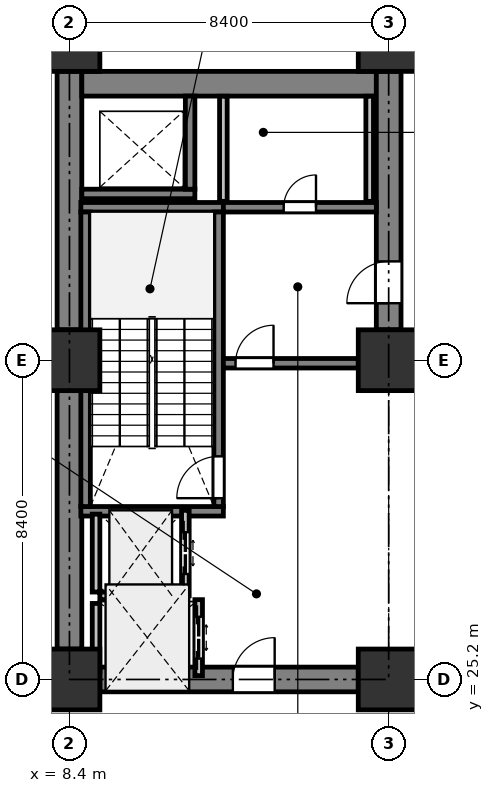
"""IFC4 building model, lengths in metres.
Left out: names, types, materials, properties, quantities, classifications, styles, units other than length and angle.
Written with IfcOpenShell. Run it as: python <this file> out.ifc"""

import sys

from ifc_helpers import new_model, si_unit, direction, frame, frame_2d, origin, origin_2d, place, context, subcontext, project, spatial, rectangle, extrude, element, fill, save


model = new_model("IFC4")
c1 = context("Model", 3, precision=1e-05, world=origin(), true_north=direction((0.0, 1.0)))
c2 = subcontext(c1, "Body", "Model", "MODEL_VIEW")
j1 = project(units=[si_unit("LENGTHUNIT", "METRE"), si_unit("PLANEANGLEUNIT", "RADIAN")], contexts=[c1])
p1 = place(None, origin())
s1 = spatial("IfcSite", under=j1, at=p1, CompositionType="ELEMENT")
p2 = place(p1, origin())
s2 = spatial("IfcBuilding", under=s1, at=p2, CompositionType="ELEMENT")
p3 = place(p2, frame((0.0, 0.0, -4.8)))
s3 = spatial("IfcBuildingStorey", under=s2, at=p3, CompositionType="ELEMENT", Elevation=-4.8)
for number, where, z_axis, x_axis in (
    (1, (8.4, 25.2, 0.0), (0.0, 0.0, 1.0), (1.0, 0.0, 0.0)),
    (2, (8.4, 33.6, 0.0), (0.0, 0.0, 1.0), (1.0, 0.0, 0.0)),
    (3, (8.4, 42.0, 0.0), (0.0, 0.0, 1.0), (1.0, 0.0, 0.0)),
    (4, (16.8, 25.2, 0.0), (0.0, 0.0, 1.0), (1.0, 0.0, 0.0)),
    (5, (16.8, 33.6, 0.0), (0.0, 0.0, 1.0), (1.0, 0.0, 0.0)),
    (6, (16.8, 42.0, 0.0), (0.0, 0.0, 1.0), (1.0, 0.0, 0.0)),
):
    element("IfcColumn", number, at=place(p3, frame(where, z_axis=z_axis, x_axis=x_axis)), inside=s3, PredefinedType="COLUMN", context=c2, shape_type="SweptSolid", body=[
        extrude(rectangle(XDim=1.6, YDim=1.6, at=origin_2d()), origin(), (0.0, 0.0, 1.0), 4.8),
    ])
for number, where, z_axis, x_axis in (
    (7, (8.4, 26.0, 0.0), (0.0, 0.0, 1.0), (0.0, 1.0, 0.0)),
    (8, (8.4, 34.4, 0.0), (0.0, 0.0, 1.0), (0.0, 1.0, 0.0)),
):
    element("IfcWall", number, at=place(p3, frame(where, z_axis=z_axis, x_axis=x_axis)), inside=s3, PredefinedType="SHEAR", context=c2, shape_type="SweptSolid", body=[
        extrude(rectangle(XDim=6.8, YDim=0.65, at=frame_2d((3.4, 0.0))), origin(), (0.0, 0.0, 1.0), 4.48),
    ])
p4 = place(p3, frame((8.725, 40.875, 0.0), z_axis=(0.0, 0.0, 1.0), x_axis=(1.0, 0.0, 0.0)))
e9 = element("IfcWall", 9, at=p4, inside=s3, PredefinedType="SHEAR", context=c2, shape_type="SweptSolid", body=[
    extrude(rectangle(XDim=7.75, YDim=0.65, at=frame_2d((3.875, 0.0))), origin(), (0.0, 0.0, 1.0), 4.48),
])
p5 = place(p3, frame((16.8, 34.4, 0.0), z_axis=(0.0, 0.0, 1.0), x_axis=(0.0, 1.0, 0.0)))
e10 = element("IfcWall", 10, at=p5, inside=s3, PredefinedType="SHEAR", context=c2, shape_type="SweptSolid", body=[
    extrude(rectangle(XDim=6.8, YDim=0.65, at=frame_2d((3.4, 0.0))), origin(), (0.0, 0.0, 1.0), 4.48),
])
p6 = place(p5, frame((0.7, 0.0, 0.0)))
e11 = element("IfcOpeningElement", 11, at=p6, cuts=e10, PredefinedType="OPENING", context=c2, shape_type="SweptSolid", body=[
    extrude(rectangle(XDim=1.1, YDim=2.15, at=frame_2d((0.55, 1.075))), frame((0.0, 0.335, 0.0), z_axis=(0.0, -1.0, 0.0), x_axis=(1.0, 0.0, 0.0)), (0.0, 0.0, 1.0), 0.67),
])
p7 = place(p3, frame((9.2, 25.2, 0.0), z_axis=(0.0, 0.0, 1.0), x_axis=(1.0, 0.0, 0.0)))
e12 = element("IfcWall", 12, at=p7, inside=s3, PredefinedType="SHEAR", context=c2, shape_type="SweptSolid", body=[
    extrude(rectangle(XDim=6.8, YDim=0.65, at=frame_2d((3.4, 0.0))), origin(), (0.0, 0.0, 1.0), 4.48),
])
p8 = place(p7, frame((3.5, 0.0, 0.0)))
e13 = element("IfcOpeningElement", 13, at=p8, cuts=e12, PredefinedType="OPENING", context=c2, shape_type="SweptSolid", body=[
    extrude(rectangle(XDim=1.1, YDim=2.15, at=frame_2d((0.55, 1.075))), frame((0.0, 0.335, 0.0), z_axis=(0.0, -1.0, 0.0), x_axis=(1.0, 0.0, 0.0)), (0.0, 0.0, 1.0), 0.67),
])
for number, where, z_axis, x_axis in (
    (14, (12.45, 29.625, 0.0), (0.0, 0.0, 1.0), (-1.0, 0.0, 0.0)),
    (15, (12.45, 37.625, 0.0), (0.0, 0.0, 1.0), (-1.0, 0.0, 0.0)),
):
    element("IfcWall", number, at=place(p3, frame(where, z_axis=z_axis, x_axis=x_axis)), inside=s3, PredefinedType="SHEAR", context=c2, shape_type="SweptSolid", body=[
        extrude(rectangle(XDim=3.75, YDim=0.25, at=frame_2d((1.875, 0.0))), origin(), (0.0, 0.0, 1.0), 4.48),
    ])
p9 = place(p3, frame((12.325, 29.75, 0.0), z_axis=(0.0, 0.0, 1.0), x_axis=(0.0, 1.0, 0.0)))
e16 = element("IfcWall", 16, at=p9, inside=s3, PredefinedType="SHEAR", context=c2, shape_type="SweptSolid", body=[
    extrude(rectangle(XDim=7.75, YDim=0.25, at=frame_2d((3.875, 0.0))), origin(), (0.0, 0.0, 1.0), 4.48),
])
p10 = place(p9, frame((0.22, 0.0, 0.0)))
e17 = element("IfcOpeningElement", 17, at=p10, cuts=e16, PredefinedType="OPENING", context=c2, shape_type="SweptSolid", body=[
    extrude(rectangle(XDim=1.1, YDim=2.15, at=frame_2d((0.55, 1.075))), frame((0.0, 0.135, 0.0), z_axis=(0.0, -1.0, 0.0), x_axis=(1.0, 0.0, 0.0)), (0.0, 0.0, 1.0), 0.27),
])
p11 = place(p3, frame((8.825, 29.75, 0.0), z_axis=(0.0, 0.0, 1.0), x_axis=(0.0, 1.0, 0.0)))
e18 = element("IfcWall", 18, at=p11, inside=s3, PredefinedType="SHEAR", context=c2, shape_type="SweptSolid", body=[
    extrude(rectangle(XDim=7.75, YDim=0.25, at=frame_2d((3.875, 0.0))), origin(), (0.0, 0.0, 1.0), 4.48),
])
p12 = place(p3, frame((8.725, 37.975, 0.0), z_axis=(0.0, 0.0, 1.0), x_axis=(1.0, 0.0, 0.0)))
e19 = element("IfcWall", 19, at=p12, inside=s3, PredefinedType="SHEAR", context=c2, shape_type="SweptSolid", body=[
    extrude(rectangle(XDim=2.975, YDim=0.25, at=frame_2d((1.487, 0.0))), origin(), (0.0, 0.0, 1.0), 4.48),
])
p13 = place(p3, frame((11.575, 38.1, 0.0), z_axis=(0.0, 0.0, 1.0), x_axis=(0.0, 1.0, 0.0)))
e20 = element("IfcWall", 20, at=p13, inside=s3, PredefinedType="SHEAR", context=c2, shape_type="SweptSolid", body=[
    extrude(rectangle(XDim=2.45, YDim=0.25, at=frame_2d((1.225, 0.0))), origin(), (0.0, 0.0, 1.0), 4.48),
])
p14 = place(p3, frame((12.45, 33.52, 0.0), z_axis=(0.0, 0.0, 1.0), x_axis=(1.0, 0.0, 0.0)))
e21 = element("IfcWall", 21, at=p14, inside=s3, PredefinedType="SHEAR", context=c2, shape_type="SweptSolid", body=[
    extrude(rectangle(XDim=3.55, YDim=0.25, at=frame_2d((1.775, 0.0))), origin(), (0.0, 0.0, 1.0), 4.48),
])
p15 = place(p14, frame((0.32, 0.0, 0.0)))
e22 = element("IfcOpeningElement", 22, at=p15, cuts=e21, PredefinedType="OPENING", context=c2, shape_type="SweptSolid", body=[
    extrude(rectangle(XDim=1.0, YDim=2.15, at=frame_2d((0.5, 1.075))), frame((0.0, 0.135, 0.0), z_axis=(0.0, -1.0, 0.0), x_axis=(1.0, 0.0, 0.0)), (0.0, 0.0, 1.0), 0.27),
])
p16 = place(p3, frame((12.45, 37.625, 0.0), z_axis=(0.0, 0.0, 1.0), x_axis=(1.0, 0.0, 0.0)))
e23 = element("IfcWall", 23, at=p16, inside=s3, PredefinedType="SHEAR", context=c2, shape_type="SweptSolid", body=[
    extrude(rectangle(XDim=4.025, YDim=0.25, at=frame_2d((2.013, 0.0))), origin(), (0.0, 0.0, 1.0), 4.48),
])
p17 = place(p16, frame((1.587, 0.0, 0.0)))
e24 = element("IfcOpeningElement", 24, at=p17, cuts=e23, PredefinedType="OPENING", context=c2, shape_type="SweptSolid", body=[
    extrude(rectangle(XDim=0.85, YDim=2.15, at=frame_2d((0.425, 1.075))), frame((0.0, 0.135, 0.0), z_axis=(0.0, -1.0, 0.0), x_axis=(1.0, 0.0, 0.0)), (0.0, 0.0, 1.0), 0.27),
])
p18 = place(p3, frame((11.45, 27.4, 0.0), z_axis=(0.0, 0.0, 1.0), x_axis=(0.0, 1.0, 0.0)))
e25 = element("IfcWall", 25, at=p18, inside=s3, PredefinedType="PARTITIONING", context=c2, shape_type="SweptSolid", body=[
    extrude(rectangle(XDim=2.25, YDim=0.2, at=frame_2d((1.125, 0.0))), origin(), (0.0, 0.0, 1.0), 4.48),
])
p19 = place(p18, frame((0.575, 0.0, 0.0)))
e26 = element("IfcOpeningElement", 26, at=p19, cuts=e25, PredefinedType="OPENING", context=c2, shape_type="SweptSolid", body=[
    extrude(rectangle(XDim=1.1, YDim=2.2, at=frame_2d((0.55, 1.1))), frame((0.0, 0.11, 0.0), z_axis=(0.0, -1.0, 0.0), x_axis=(1.0, 0.0, 0.0)), (0.0, 0.0, 1.0), 0.22),
])
p20 = place(p3, frame((9.1, 27.5, 0.0), z_axis=(0.0, 0.0, 1.0), x_axis=(0.0, 1.0, 0.0)))
e27 = element("IfcWall", 27, at=p20, inside=s3, PredefinedType="PARTITIONING", context=c2, shape_type="SweptSolid", body=[
    extrude(rectangle(XDim=2.05, YDim=0.2, at=frame_2d((1.025, 0.0))), origin(), (0.0, 0.0, 1.0), 4.48),
])
p21 = place(p3, frame((9.2, 27.4, 0.0), z_axis=(0.0, 0.0, 1.0), x_axis=(1.0, 0.0, 0.0)))
e28 = element("IfcWall", 28, at=p21, inside=s3, PredefinedType="PARTITIONING", context=c2, shape_type="SweptSolid", body=[
    extrude(rectangle(XDim=2.15, YDim=0.2, at=frame_2d((1.075, 0.0))), origin(), (0.0, 0.0, 1.0), 4.48),
])
p22 = place(p3, frame((11.8, 25.3, 0.0), z_axis=(0.0, 0.0, 1.0), x_axis=(0.0, 1.0, 0.0)))
e29 = element("IfcWall", 29, at=p22, inside=s3, PredefinedType="PARTITIONING", context=c2, shape_type="SweptSolid", body=[
    extrude(rectangle(XDim=2.0, YDim=0.2, at=frame_2d((1.0, 0.0))), origin(), (0.0, 0.0, 1.0), 4.48),
])
p23 = place(p22, frame((0.45, 0.0, 0.0)))
e30 = element("IfcOpeningElement", 30, at=p23, cuts=e29, PredefinedType="OPENING", context=c2, shape_type="SweptSolid", body=[
    extrude(rectangle(XDim=1.1, YDim=2.2, at=frame_2d((0.55, 1.1))), frame((0.0, 0.11, 0.0), z_axis=(0.0, -1.0, 0.0), x_axis=(1.0, 0.0, 0.0)), (0.0, 0.0, 1.0), 0.22),
])
p24 = place(p3, frame((9.1, 25.4, 0.0), z_axis=(0.0, 0.0, 1.0), x_axis=(0.0, 1.0, 0.0)))
e31 = element("IfcWall", 31, at=p24, inside=s3, PredefinedType="PARTITIONING", context=c2, shape_type="SweptSolid", body=[
    extrude(rectangle(XDim=1.8, YDim=0.2, at=frame_2d((0.9, 0.0))), origin(), (0.0, 0.0, 1.0), 4.48),
])
for number, where, z_axis, x_axis in (
    (32, (16.3, 37.78, 0.0), (0.0, 0.0, 1.0), (0.0, 1.0, 0.0)),
    (33, (12.45, 40.546, 0.0), (0.0, 0.0, 1.0), (0.0, -1.0, 0.0)),
):
    element("IfcWall", number, at=place(p3, frame(where, z_axis=z_axis, x_axis=x_axis)), inside=s3, PredefinedType="PARTITIONING", context=c2, shape_type="SweptSolid", body=[
        extrude(rectangle(XDim=2.766, YDim=0.2, at=frame_2d((1.383, 0.0))), origin(), (0.0, 0.0, 1.0), 4.48),
    ])
p25 = place(p6, origin())
e34 = element("IfcDoor", 34, at=p25, inside=s3, OperationType="SINGLE_SWING_LEFT", PredefinedType="DOOR", context=c2, shape_type="SweptSolid", body=[
    extrude(rectangle(XDim=1.1, YDim=2.15, at=frame_2d((0.55, 1.075))), frame((0.0, 0.025, 0.0), z_axis=(0.0, -1.0, 0.0), x_axis=(1.0, 0.0, 0.0)), (0.0, 0.0, 1.0), 0.05),
])
fill(e11, e34)
p26 = place(p8, origin())
e35 = element("IfcDoor", 35, at=p26, inside=s3, OperationType="SINGLE_SWING_RIGHT", PredefinedType="DOOR", context=c2, shape_type="SweptSolid", body=[
    extrude(rectangle(XDim=1.1, YDim=2.15, at=frame_2d((0.55, 1.075))), frame((0.0, 0.025, 0.0), z_axis=(0.0, -1.0, 0.0), x_axis=(1.0, 0.0, 0.0)), (0.0, 0.0, 1.0), 0.05),
])
fill(e13, e35)
p27 = place(p10, origin())
e36 = element("IfcDoor", 36, at=p27, inside=s3, OperationType="SINGLE_SWING_LEFT", PredefinedType="DOOR", context=c2, shape_type="SweptSolid", body=[
    extrude(rectangle(XDim=1.1, YDim=2.15, at=frame_2d((0.55, 1.075))), frame((0.0, 0.025, 0.0), z_axis=(0.0, -1.0, 0.0), x_axis=(1.0, 0.0, 0.0)), (0.0, 0.0, 1.0), 0.05),
])
fill(e17, e36)
p28 = place(p15, origin())
e37 = element("IfcDoor", 37, at=p28, inside=s3, OperationType="SINGLE_SWING_RIGHT", PredefinedType="DOOR", context=c2, shape_type="SweptSolid", body=[
    extrude(rectangle(XDim=1.0, YDim=2.15, at=frame_2d((0.5, 1.075))), frame((0.0, 0.025, 0.0), z_axis=(0.0, -1.0, 0.0), x_axis=(1.0, 0.0, 0.0)), (0.0, 0.0, 1.0), 0.05),
])
fill(e22, e37)
p29 = place(p19, origin())
e38 = element("IfcDoor", 38, at=p29, inside=s3, OperationType="DOUBLE_DOOR_SLIDING", PredefinedType="DOOR", context=c2, shape_type="SweptSolid", body=[
    extrude(rectangle(XDim=1.1, YDim=2.2, at=frame_2d((0.55, 1.1))), frame((0.0, 0.025, 0.0), z_axis=(0.0, -1.0, 0.0), x_axis=(1.0, 0.0, 0.0)), (0.0, 0.0, 1.0), 0.05),
])
fill(e26, e38)
p30 = place(p23, origin())
e39 = element("IfcDoor", 39, at=p30, inside=s3, OperationType="DOUBLE_DOOR_SLIDING", PredefinedType="DOOR", context=c2, shape_type="SweptSolid", body=[
    extrude(rectangle(XDim=1.1, YDim=2.2, at=frame_2d((0.55, 1.1))), frame((0.0, 0.025, 0.0), z_axis=(0.0, -1.0, 0.0), x_axis=(1.0, 0.0, 0.0)), (0.0, 0.0, 1.0), 0.05),
])
fill(e30, e39)
p31 = place(p17, origin())
e40 = element("IfcDoor", 40, at=p31, inside=s3, OperationType="SINGLE_SWING_RIGHT", PredefinedType="DOOR", context=c2, shape_type="SweptSolid", body=[
    extrude(rectangle(XDim=0.85, YDim=2.15, at=frame_2d((0.425, 1.075))), frame((0.0, 0.025, 0.0), z_axis=(0.0, -1.0, 0.0), x_axis=(1.0, 0.0, 0.0)), (0.0, 0.0, 1.0), 0.05),
])
fill(e24, e40)
save(model, sys.argv[1])
